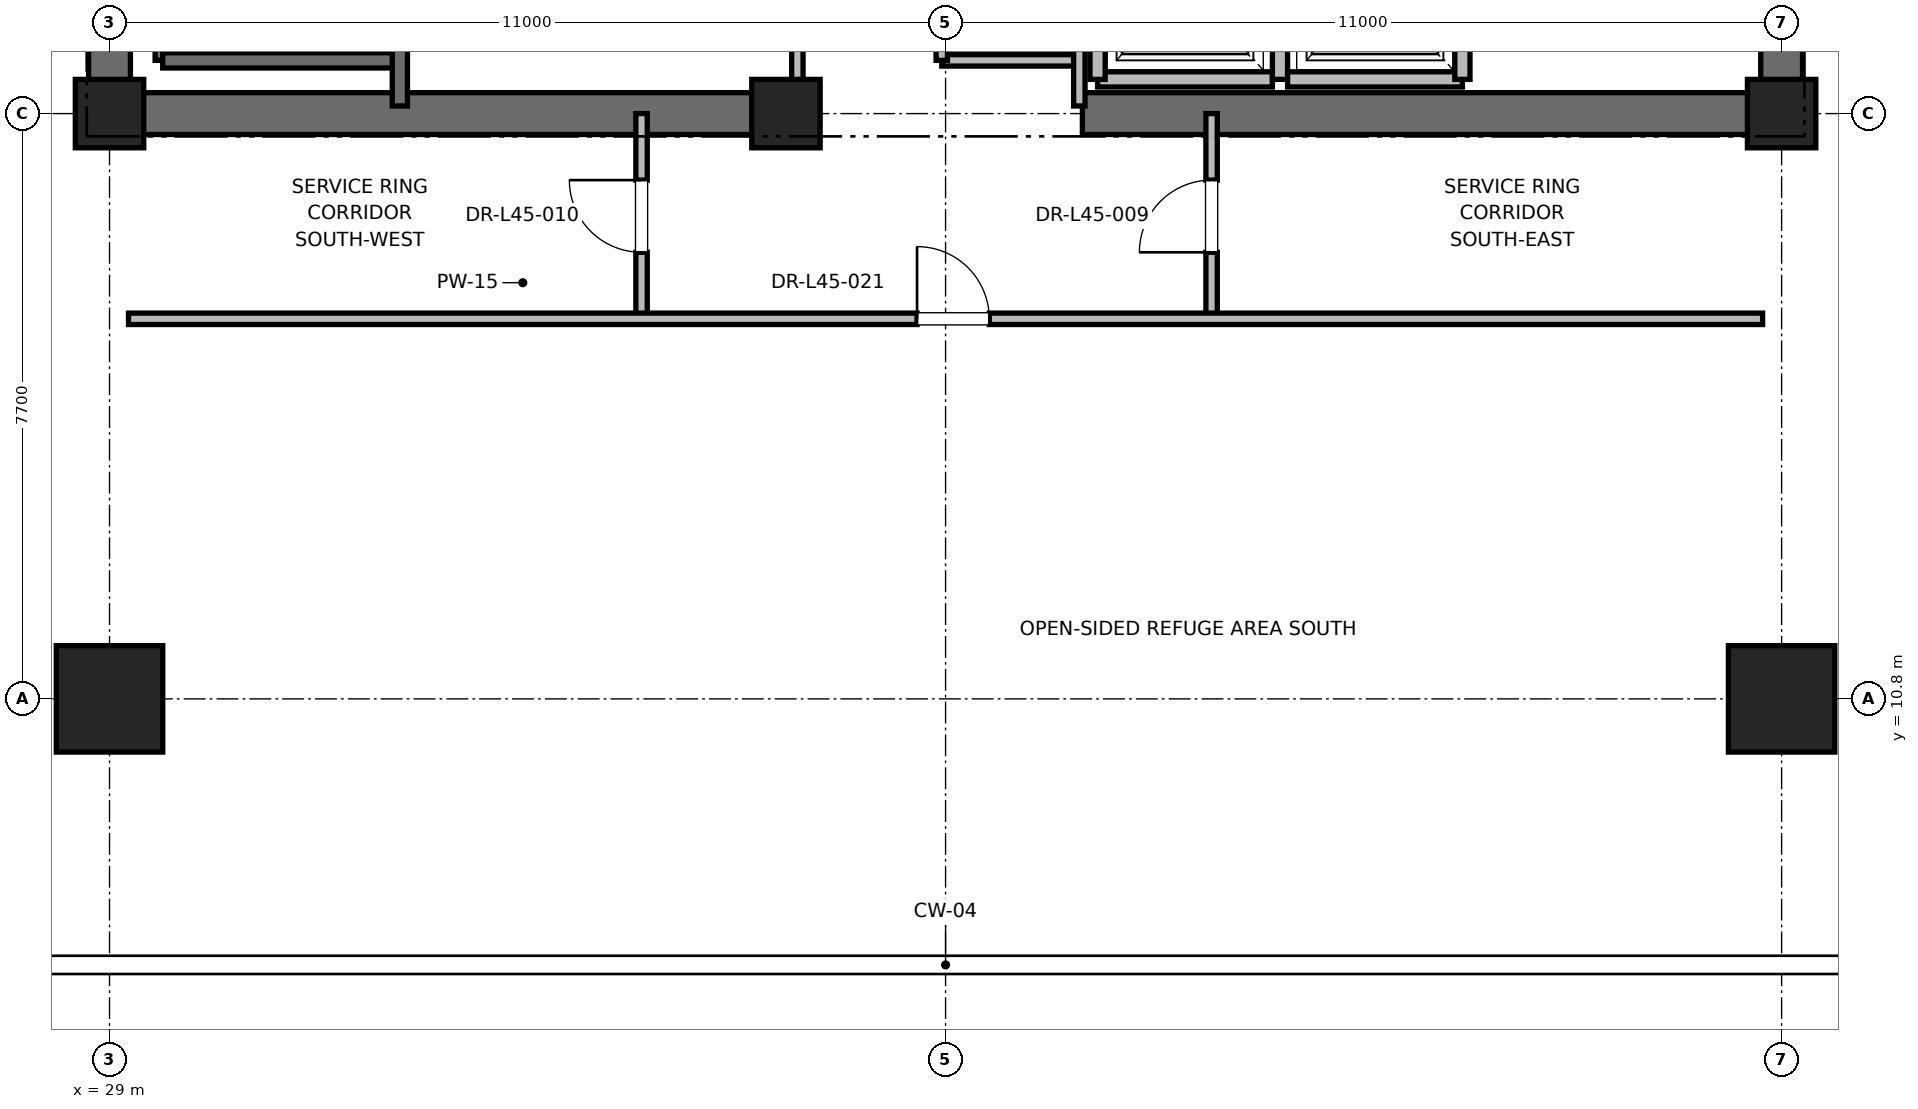
"""IFC4 building model, lengths in metres.
Left out: names, types, materials, properties, quantities, classifications, styles, units other than length and angle.
Written with IfcOpenShell. Run it as: python <this file> out.ifc"""

import sys

from ifc_helpers import new_model, si_unit, direction, frame, frame_2d, origin, origin_2d, place, context, subcontext, project, spatial, rectangle, extrude, element, fill, save


model = new_model("IFC4")
c1 = context("Model", 3, precision=1e-05, world=origin(), true_north=direction((0.0, 1.0)))
c2 = subcontext(c1, "Body", "Model", "MODEL_VIEW")
j1 = project(units=[si_unit("LENGTHUNIT", "METRE"), si_unit("PLANEANGLEUNIT", "RADIAN")], contexts=[c1])
p1 = place(None, origin())
s1 = spatial("IfcSite", under=j1, at=p1, CompositionType="ELEMENT")
p2 = place(p1, origin())
s2 = spatial("IfcBuilding", under=s1, at=p2, CompositionType="ELEMENT")
p3 = place(p2, frame((0.0, 0.0, 194.8)))
s3 = spatial("IfcBuildingStorey", under=s2, at=p3, CompositionType="ELEMENT", Elevation=194.8)
for number, where, z_axis, x_axis in (
    (1, (29.0, 10.8, 0.0), (0.0, 0.0, 1.0), (1.0, 0.0, 0.0)),
    (2, (51.0, 10.8, 0.0), (0.0, 0.0, 1.0), (1.0, 0.0, 0.0)),
):
    element("IfcColumn", number, at=place(p3, frame(where, z_axis=z_axis, x_axis=x_axis)), inside=s3, PredefinedType="COLUMN", context=c2, shape_type="SweptSolid", body=[
        extrude(rectangle(XDim=1.4, YDim=1.4, at=origin_2d()), origin(), (0.0, 0.0, 1.0), 5.4),
    ])
for number, where, z_axis, x_axis in (
    (3, (29.0, 18.5, 0.0), (0.0, 0.0, 1.0), (1.0, 0.0, 0.0)),
    (4, (51.0, 18.5, 0.0), (0.0, 0.0, 1.0), (1.0, 0.0, 0.0)),
    (5, (37.9, 18.5, 0.0), (0.0, 0.0, 1.0), (1.0, 0.0, 0.0)),
):
    element("IfcColumn", number, at=place(p3, frame(where, z_axis=z_axis, x_axis=x_axis)), inside=s3, PredefinedType="PILASTER", context=c2, shape_type="SweptSolid", body=[
        extrude(rectangle(XDim=0.9, YDim=0.9, at=origin_2d()), origin(), (0.0, 0.0, 1.0), 5.4),
    ])
for number, where, z_axis, x_axis in (
    (6, (29.0, 18.5, 0.0), (0.0, 0.0, 1.0), (1.0, 0.0, 0.0)),
    (7, (41.8, 18.5, 0.0), (0.0, 0.0, 1.0), (1.0, 0.0, 0.0)),
):
    element("IfcWall", number, at=place(p3, frame(where, z_axis=z_axis, x_axis=x_axis)), inside=s3, PredefinedType="SHEAR", context=c2, shape_type="SweptSolid", body=[
        extrude(rectangle(XDim=9.2, YDim=0.55, at=frame_2d((4.6, 0.0))), origin(), (0.0, 0.0, 1.0), 5.1),
    ])
p4 = place(p3, frame((29.0, 18.5, 0.0), z_axis=(0.0, 0.0, 1.0), x_axis=(0.0, 1.0, 0.0)))
e8 = element("IfcWall", 8, at=p4, inside=s3, PredefinedType="SHEAR", context=c2, shape_type="SweptSolid", body=[
    extrude(rectangle(XDim=8.8, YDim=0.55, at=frame_2d((4.4, 0.0))), origin(), (0.0, 0.0, 1.0), 5.1),
])
p5 = place(p3, frame((51.0, 18.5, 0.0), z_axis=(0.0, 0.0, 1.0), x_axis=(0.0, 1.0, 0.0)))
e9 = element("IfcWall", 9, at=p5, inside=s3, PredefinedType="SHEAR", context=c2, shape_type="SweptSolid", body=[
    extrude(rectangle(XDim=5.8, YDim=0.55, at=frame_2d((2.9, 0.0))), origin(), (0.0, 0.0, 1.0), 5.1),
])
p6 = place(p3, frame((29.7, 19.2, 0.0), z_axis=(0.0, 0.0, 1.0), x_axis=(0.0, 1.0, 0.0)))
e10 = element("IfcWall", 10, at=p6, inside=s3, PredefinedType="SOLIDWALL", context=c2, shape_type="SweptSolid", body=[
    extrude(rectangle(XDim=8.15, YDim=0.2, at=frame_2d((4.075, 0.0))), origin(), (0.0, 0.0, 1.0), 5.1),
])
p7 = place(p3, frame((29.7, 19.2, 0.0), z_axis=(0.0, 0.0, 1.0), x_axis=(1.0, 0.0, 0.0)))
e11 = element("IfcWall", 11, at=p7, inside=s3, PredefinedType="SOLIDWALL", context=c2, shape_type="SweptSolid", body=[
    extrude(rectangle(XDim=3.12, YDim=0.2, at=frame_2d((1.56, 0.0))), origin(), (0.0, 0.0, 1.0), 5.1),
])
p8 = place(p3, frame((32.82, 18.6, 0.0), z_axis=(0.0, 0.0, 1.0), x_axis=(0.0, 1.0, 0.0)))
e12 = element("IfcWall", 12, at=p8, inside=s3, PredefinedType="SOLIDWALL", context=c2, shape_type="SweptSolid", body=[
    extrude(rectangle(XDim=8.78, YDim=0.2, at=frame_2d((4.39, 0.0))), origin(), (0.0, 0.0, 1.0), 5.1),
])
p9 = place(p3, frame((42.0, 18.95, 0.0), z_axis=(0.0, 0.0, 1.0), x_axis=(1.0, 0.0, 0.0)))
e13 = element("IfcWall", 13, at=p9, inside=s3, PredefinedType="SOLIDWALL", context=c2, shape_type="SweptSolid", body=[
    extrude(rectangle(XDim=2.3, YDim=0.2, at=frame_2d((1.15, 0.0))), origin(), (0.0, 0.0, 1.0), 4.08),
])
p10 = place(p3, frame((42.0, 21.55, 0.0), z_axis=(0.0, 0.0, 1.0), x_axis=(0.0, -1.0, 0.0)))
e14 = element("IfcWall", 14, at=p10, inside=s3, PredefinedType="SOLIDWALL", context=c2, shape_type="SweptSolid", body=[
    extrude(rectangle(XDim=2.6, YDim=0.2, at=frame_2d((1.3, 0.0))), origin(), (0.0, 0.0, 1.0), 4.08),
])
p11 = place(p3, frame((44.4, 18.95, 0.0), z_axis=(0.0, 0.0, 1.0), x_axis=(0.0, 1.0, 0.0)))
e15 = element("IfcWall", 15, at=p11, inside=s3, PredefinedType="SOLIDWALL", context=c2, shape_type="SweptSolid", body=[
    extrude(rectangle(XDim=2.6, YDim=0.2, at=frame_2d((1.3, 0.0))), origin(), (0.0, 0.0, 1.0), 5.1),
])
p12 = place(p3, frame((44.5, 18.95, 0.0), z_axis=(0.0, 0.0, 1.0), x_axis=(1.0, 0.0, 0.0)))
e16 = element("IfcWall", 16, at=p12, inside=s3, PredefinedType="SOLIDWALL", context=c2, shape_type="SweptSolid", body=[
    extrude(rectangle(XDim=2.3, YDim=0.2, at=frame_2d((1.15, 0.0))), origin(), (0.0, 0.0, 1.0), 5.1),
])
p13 = place(p3, frame((46.8, 18.95, 0.0), z_axis=(0.0, 0.0, 1.0), x_axis=(0.0, 1.0, 0.0)))
e17 = element("IfcWall", 17, at=p13, inside=s3, PredefinedType="SOLIDWALL", context=c2, shape_type="SweptSolid", body=[
    extrude(rectangle(XDim=2.6, YDim=0.2, at=frame_2d((1.3, 0.0))), origin(), (0.0, 0.0, 1.0), 5.1),
])
p14 = place(p3, frame((39.95, 19.2, 0.0), z_axis=(0.0, 0.0, 1.0), x_axis=(1.0, 0.0, 0.0)))
e18 = element("IfcWall", 18, at=p14, inside=s3, PredefinedType="PARTITIONING", context=c2, shape_type="SweptSolid", body=[
    extrude(rectangle(XDim=1.81, YDim=0.15, at=frame_2d((0.905, 0.0))), origin(), (0.0, 0.0, 1.0), 2.85),
])
p15 = place(p3, frame((41.76, 18.6, 0.0), z_axis=(0.0, 0.0, 1.0), x_axis=(0.0, 1.0, 0.0)))
e19 = element("IfcWall", 19, at=p15, inside=s3, PredefinedType="PARTITIONING", context=c2, shape_type="SweptSolid", body=[
    extrude(rectangle(XDim=3.6, YDim=0.15, at=frame_2d((1.8, 0.0))), origin(), (0.0, 0.0, 1.0), 2.85),
])
p16 = place(p3, frame((39.95, 19.2, 0.0), z_axis=(0.0, 0.0, 1.0), x_axis=(0.0, 1.0, 0.0)))
e20 = element("IfcWall", 20, at=p16, inside=s3, PredefinedType="PARTITIONING", context=c2, shape_type="SweptSolid", body=[
    extrude(rectangle(XDim=3.0, YDim=0.15, at=frame_2d((1.5, 0.0))), origin(), (0.0, 0.0, 1.0), 2.85),
])
p17 = place(p16, frame((1.05, 0.0, 0.0)))
e21 = element("IfcOpeningElement", 21, at=p17, cuts=e20, PredefinedType="OPENING", context=c2, shape_type="SweptSolid", body=[
    extrude(rectangle(XDim=0.9, YDim=2.1, at=frame_2d((0.45, 1.05))), frame((0.0, 0.075, 0.0), z_axis=(0.0, -1.0, 0.0), x_axis=(1.0, 0.0, 0.0)), (0.0, 0.0, 1.0), 0.15),
])
p18 = place(p3, frame((38.05, 18.6, 0.0), z_axis=(0.0, 0.0, 1.0), x_axis=(0.0, 1.0, 0.0)))
e22 = element("IfcWall", 22, at=p18, inside=s3, PredefinedType="PARTITIONING", context=c2, shape_type="SweptSolid", body=[
    extrude(rectangle(XDim=3.06, YDim=0.15, at=frame_2d((1.53, 0.0))), origin(), (0.0, 0.0, 1.0), 2.85),
])
p19 = place(p18, frame((1.09, 0.0, 0.0)))
e23 = element("IfcOpeningElement", 23, at=p19, cuts=e22, PredefinedType="OPENING", context=c2, shape_type="SweptSolid", body=[
    extrude(rectangle(XDim=0.88, YDim=2.1, at=frame_2d((0.44, 1.05))), frame((0.0, 0.075, 0.0), z_axis=(0.0, -1.0, 0.0), x_axis=(1.0, 0.0, 0.0)), (0.0, 0.0, 1.0), 0.15),
])
p20 = place(p3, frame((36.0, 15.8, 0.0), z_axis=(0.0, 0.0, 1.0), x_axis=(0.0, 1.0, 0.0)))
e24 = element("IfcWall", 24, at=p20, inside=s3, PredefinedType="PARTITIONING", context=c2, shape_type="SweptSolid", body=[
    extrude(rectangle(XDim=2.7, YDim=0.15, at=frame_2d((1.35, 0.0))), origin(), (0.0, 0.0, 1.0), 2.85),
])
p21 = place(p20, frame((0.875, 0.0, 0.0)))
e25 = element("IfcOpeningElement", 25, at=p21, cuts=e24, PredefinedType="OPENING", context=c2, shape_type="SweptSolid", body=[
    extrude(rectangle(XDim=0.95, YDim=2.15, at=frame_2d((0.475, 1.075))), frame((0.0, 0.075, 0.0), z_axis=(0.0, -1.0, 0.0), x_axis=(1.0, 0.0, 0.0)), (0.0, 0.0, 1.0), 0.15),
])
p22 = place(p3, frame((43.5, 15.8, 0.0), z_axis=(0.0, 0.0, 1.0), x_axis=(0.0, 1.0, 0.0)))
e26 = element("IfcWall", 26, at=p22, inside=s3, PredefinedType="PARTITIONING", context=c2, shape_type="SweptSolid", body=[
    extrude(rectangle(XDim=2.7, YDim=0.15, at=frame_2d((1.35, 0.0))), origin(), (0.0, 0.0, 1.0), 2.85),
])
p23 = place(p22, frame((0.875, 0.0, 0.0)))
e27 = element("IfcOpeningElement", 27, at=p23, cuts=e26, PredefinedType="OPENING", context=c2, shape_type="SweptSolid", body=[
    extrude(rectangle(XDim=0.95, YDim=2.15, at=frame_2d((0.475, 1.075))), frame((0.0, 0.075, 0.0), z_axis=(0.0, -1.0, 0.0), x_axis=(1.0, 0.0, 0.0)), (0.0, 0.0, 1.0), 0.15),
])
p24 = place(p3, frame((29.25, 15.8, 0.0), z_axis=(0.0, 0.0, 1.0), x_axis=(1.0, 0.0, 0.0)))
e28 = element("IfcWall", 28, at=p24, inside=s3, PredefinedType="PARTITIONING", context=c2, shape_type="SweptSolid", body=[
    extrude(rectangle(XDim=21.5, YDim=0.15, at=frame_2d((10.75, 0.0))), origin(), (0.0, 0.0, 1.0), 2.85),
])
p25 = place(p24, frame((10.375, 0.0, 0.0)))
e29 = element("IfcOpeningElement", 29, at=p25, cuts=e28, PredefinedType="OPENING", context=c2, shape_type="SweptSolid", body=[
    extrude(rectangle(XDim=0.95, YDim=2.15, at=frame_2d((0.475, 1.075))), frame((0.0, 0.075, 0.0), z_axis=(0.0, -1.0, 0.0), x_axis=(1.0, 0.0, 0.0)), (0.0, 0.0, 1.0), 0.15),
])
p26 = place(p21, origin())
e30 = element("IfcDoor", 30, at=p26, inside=s3, OperationType="SINGLE_SWING_RIGHT", PredefinedType="DOOR", context=c2, shape_type="SweptSolid", body=[
    extrude(rectangle(XDim=0.95, YDim=2.15, at=frame_2d((0.475, 1.075))), frame((0.0, 0.025, 0.0), z_axis=(0.0, -1.0, 0.0), x_axis=(1.0, 0.0, 0.0)), (0.0, 0.0, 1.0), 0.05),
])
fill(e25, e30)
p27 = place(p23, origin())
e31 = element("IfcDoor", 31, at=p27, inside=s3, OperationType="SINGLE_SWING_LEFT", PredefinedType="DOOR", context=c2, shape_type="SweptSolid", body=[
    extrude(rectangle(XDim=0.95, YDim=2.15, at=frame_2d((0.475, 1.075))), frame((0.0, 0.025, 0.0), z_axis=(0.0, -1.0, 0.0), x_axis=(1.0, 0.0, 0.0)), (0.0, 0.0, 1.0), 0.05),
])
fill(e27, e31)
p28 = place(p25, origin())
e32 = element("IfcDoor", 32, at=p28, inside=s3, OperationType="SINGLE_SWING_LEFT", PredefinedType="DOOR", context=c2, shape_type="SweptSolid", body=[
    extrude(rectangle(XDim=0.95, YDim=2.15, at=frame_2d((0.475, 1.075))), frame((0.0, 0.025, 0.0), z_axis=(0.0, -1.0, 0.0), x_axis=(1.0, 0.0, 0.0)), (0.0, 0.0, 1.0), 0.05),
])
fill(e29, e32)
save(model, sys.argv[1])
